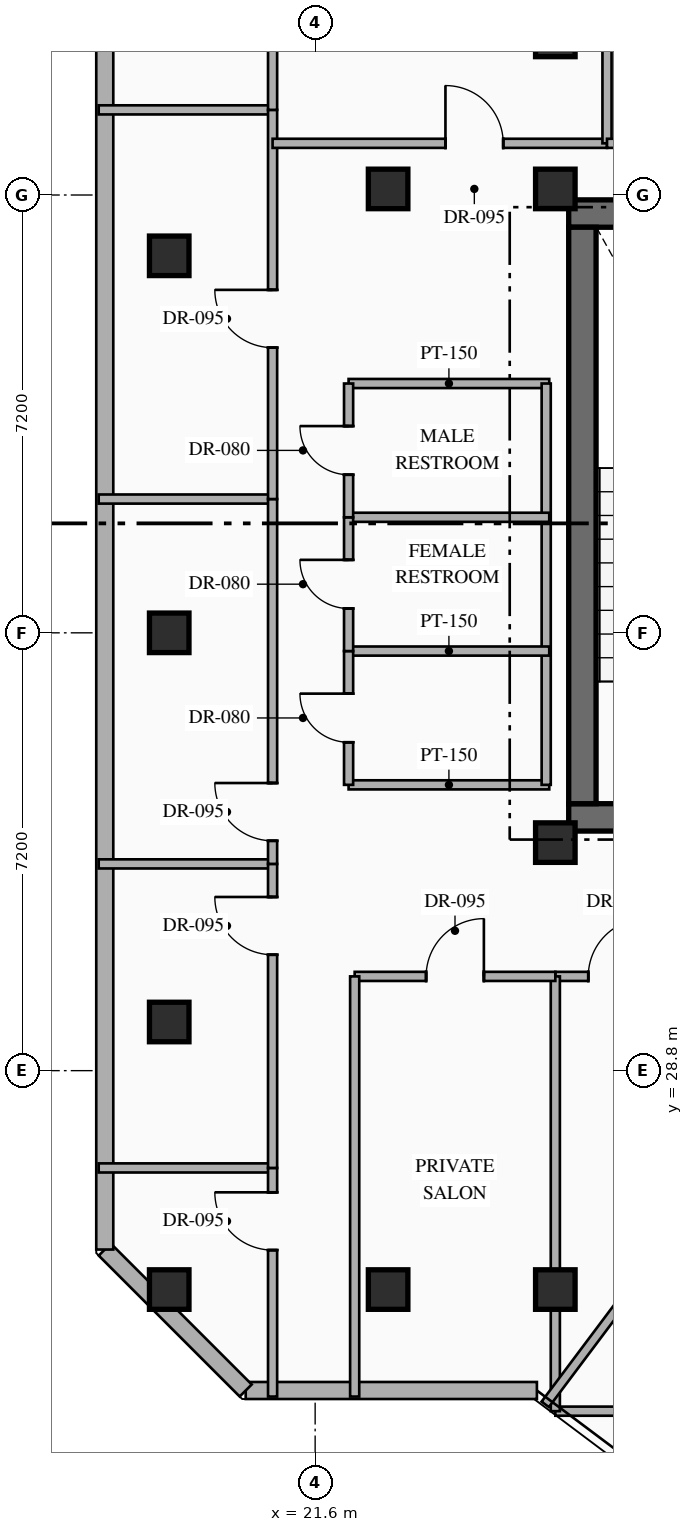
"""IFC4 building model, lengths in metres.
Left out: names, types, materials, properties, quantities, classifications, styles, units other than length and angle.
Written with IfcOpenShell. Run it as: python <this file> out.ifc"""

import sys

from ifc_helpers import new_model, si_unit, direction, frame, frame_2d, origin, origin_2d, place, context, subcontext, project, spatial, rectangle, hollow_rectangle, extrude, element, fill, save


model = new_model("IFC4")
c1 = context("Model", 3, precision=1e-05, world=origin(), true_north=direction((0.0, 1.0)))
c2 = subcontext(c1, "Body", "Model", "MODEL_VIEW")
j1 = project(units=[si_unit("LENGTHUNIT", "METRE"), si_unit("PLANEANGLEUNIT", "RADIAN")], contexts=[c1])
p1 = place(None, origin())
s1 = spatial("IfcSite", under=j1, at=p1, CompositionType="ELEMENT")
p2 = place(p1, origin())
s2 = spatial("IfcBuilding", under=s1, at=p2, CompositionType="ELEMENT")
p3 = place(p2, frame((0.0, 0.0, 246.75)))
s3 = spatial("IfcBuildingStorey", under=s2, at=p3, CompositionType="ELEMENT", Elevation=246.75)
p4 = place(p3, frame((25.77, 32.965, 0.0), z_axis=(0.0, 0.0, 1.0), x_axis=(1.0, 0.0, 0.0)))
e1 = element("IfcWall", 1, at=p4, inside=s3, PredefinedType="SHEAR", context=c2, shape_type="SweptSolid", body=[
    extrude(rectangle(XDim=7.48, YDim=0.45, at=frame_2d((3.74, 0.0))), origin(), (0.0, 0.0, 1.0), 3.6),
])
p5 = place(p4, frame((2.68, 0.0, 0.0)))
e2 = element("IfcOpeningElement", 2, at=p5, cuts=e1, PredefinedType="OPENING", context=c2, shape_type="SweptSolid", body=[
    extrude(rectangle(XDim=1.1, YDim=2.2, at=frame_2d((0.55, 1.1))), frame((0.0, 0.235, 0.0), z_axis=(0.0, -1.0, 0.0), x_axis=(1.0, 0.0, 0.0)), (0.0, 0.0, 1.0), 0.47),
])
p6 = place(p4, frame((5.43, 0.0, 0.0)))
e3 = element("IfcOpeningElement", 3, at=p6, cuts=e1, PredefinedType="OPENING", context=c2, shape_type="SweptSolid", body=[
    extrude(rectangle(XDim=1.1, YDim=2.15, at=frame_2d((0.55, 1.075))), frame((0.0, 0.235, 0.0), z_axis=(0.0, -1.0, 0.0), x_axis=(1.0, 0.0, 0.0)), (0.0, 0.0, 1.0), 0.47),
])
p7 = place(p3, frame((25.77, 42.895, 0.0), z_axis=(0.0, 0.0, 1.0), x_axis=(1.0, 0.0, 0.0)))
e4 = element("IfcWall", 4, at=p7, inside=s3, PredefinedType="SHEAR", context=c2, shape_type="SweptSolid", body=[
    extrude(rectangle(XDim=7.48, YDim=0.45, at=frame_2d((3.74, 0.0))), origin(), (0.0, 0.0, 1.0), 3.6),
])
p8 = place(p3, frame((25.995, 33.19, 0.0), z_axis=(0.0, 0.0, 1.0), x_axis=(0.0, 1.0, 0.0)))
e5 = element("IfcWall", 5, at=p8, inside=s3, PredefinedType="SHEAR", context=c2, shape_type="SweptSolid", body=[
    extrude(rectangle(XDim=9.48, YDim=0.45, at=frame_2d((4.74, 0.0))), origin(), (0.0, 0.0, 1.0), 3.6),
])
for number, where, z_axis, x_axis in (
    (6, (25.55, 32.55, 0.0), (0.0, 0.0, 1.0), (1.0, 0.0, 0.0)),
    (7, (25.55, 43.3, 0.0), (0.0, 0.0, 1.0), (1.0, 0.0, 0.0)),
    (8, (25.55, 25.2, 0.0), (0.0, 0.0, 1.0), (1.0, 0.0, 0.0)),
    (9, (25.55, 45.8, 0.0), (0.0, 0.0, 1.0), (1.0, 0.0, 0.0)),
    (10, (19.2, 25.2, 0.0), (0.0, 0.0, 1.0), (1.0, 0.0, 0.0)),
    (11, (19.2, 29.6, 0.0), (0.0, 0.0, 1.0), (1.0, 0.0, 0.0)),
    (12, (19.2, 42.2, 0.0), (0.0, 0.0, 1.0), (1.0, 0.0, 0.0)),
    (13, (22.8, 25.2, 0.0), (0.0, 0.0, 1.0), (1.0, 0.0, 0.0)),
    (14, (22.8, 43.3, 0.0), (0.0, 0.0, 1.0), (1.0, 0.0, 0.0)),
    (15, (19.2, 36.0, 0.0), (0.0, 0.0, 1.0), (1.0, 0.0, 0.0)),
):
    element("IfcColumn", number, at=place(p3, frame(where, z_axis=z_axis, x_axis=x_axis)), inside=s3, PredefinedType="COLUMN", context=c2, shape_type="SweptSolid", body=[
        extrude(hollow_rectangle(XDim=0.65, YDim=0.65, WallThickness=0.025, at=origin_2d()), origin(), (0.0, 0.0, 1.0), 3.6),
    ])
p9 = place(p3, frame((25.247, 23.54, 0.0), z_axis=(0.0, 0.0, 1.0), x_axis=(-1.0, 0.0, 0.0)))
e16 = element("IfcWall", 16, at=p9, inside=s3, PredefinedType="STANDARD", context=c2, shape_type="SweptSolid", body=[
    extrude(rectangle(XDim=4.789, YDim=0.28, at=frame_2d((2.395, 0.0))), origin(), (0.0, 0.0, 1.0), 3.35),
])
p10 = place(p3, frame((20.458, 23.54, 0.0), z_axis=(0.0, 0.0, 1.0), x_axis=(-0.707144017911, 0.707069542501, 0.0)))
e17 = element("IfcWall", 17, at=p10, inside=s3, PredefinedType="STANDARD", context=c2, shape_type="SweptSolid", body=[
    extrude(rectangle(XDim=3.278, YDim=0.28, at=frame_2d((1.639, 0.0))), origin(), (0.0, 0.0, 1.0), 3.35),
])
p11 = place(p3, frame((18.14, 25.858, 0.0), z_axis=(0.0, 0.0, 1.0), x_axis=(0.0, 1.0, 0.0)))
e18 = element("IfcWall", 18, at=p11, inside=s3, PredefinedType="STANDARD", context=c2, shape_type="SweptSolid", body=[
    extrude(rectangle(XDim=22.084, YDim=0.28, at=frame_2d((11.042, 0.0))), origin(), (0.0, 0.0, 1.0), 3.35),
])
for number, where, z_axis, x_axis in (
    (19, (22.15, 33.5, 0.0), (0.0, 0.0, 1.0), (1.0, 0.0, 0.0)),
    (20, (22.15, 40.1, 0.0), (0.0, 0.0, 1.0), (1.0, 0.0, 0.0)),
):
    element("IfcWall", number, at=place(p3, frame(where, z_axis=z_axis, x_axis=x_axis)), inside=s3, PredefinedType="PARTITIONING", context=c2, shape_type="SweptSolid", body=[
        extrude(rectangle(XDim=3.3, YDim=0.15, at=frame_2d((1.65, 0.0))), origin(), (0.0, 0.0, 1.0), 3.35),
    ])
p12 = place(p3, frame((25.4, 33.5, 0.0), z_axis=(0.0, 0.0, 1.0), x_axis=(0.0, 1.0, 0.0)))
e21 = element("IfcWall", 21, at=p12, inside=s3, PredefinedType="PARTITIONING", context=c2, shape_type="SweptSolid", body=[
    extrude(rectangle(XDim=6.6, YDim=0.15, at=frame_2d((3.3, 0.0))), origin(), (0.0, 0.0, 1.0), 3.35),
])
for number, where, z_axis, x_axis in (
    (22, (22.15, 35.7, 0.0), (0.0, 0.0, 1.0), (1.0, 0.0, 0.0)),
    (23, (22.15, 37.9, 0.0), (0.0, 0.0, 1.0), (1.0, 0.0, 0.0)),
):
    element("IfcWall", number, at=place(p3, frame(where, z_axis=z_axis, x_axis=x_axis)), inside=s3, PredefinedType="PARTITIONING", context=c2, shape_type="SweptSolid", body=[
        extrude(rectangle(XDim=3.3, YDim=0.15, at=frame_2d((1.65, 0.0))), origin(), (0.0, 0.0, 1.0), 3.35),
    ])
p13 = place(p3, frame((22.15, 33.5, 0.0), z_axis=(0.0, 0.0, 1.0), x_axis=(0.0, 1.0, 0.0)))
e24 = element("IfcWall", 24, at=p13, inside=s3, PredefinedType="PARTITIONING", context=c2, shape_type="SweptSolid", body=[
    extrude(rectangle(XDim=2.2, YDim=0.15, at=frame_2d((1.1, 0.0))), origin(), (0.0, 0.0, 1.0), 3.35),
])
p14 = place(p13, frame((0.7, 0.0, 0.0)))
e25 = element("IfcOpeningElement", 25, at=p14, cuts=e24, PredefinedType="OPENING", context=c2, shape_type="SweptSolid", body=[
    extrude(rectangle(XDim=0.8, YDim=2.06, at=frame_2d((0.4, 1.03))), frame((0.0, 0.085, 0.0), z_axis=(0.0, -1.0, 0.0), x_axis=(1.0, 0.0, 0.0)), (0.0, 0.0, 1.0), 0.17),
])
p15 = place(p3, frame((22.15, 35.7, 0.0), z_axis=(0.0, 0.0, 1.0), x_axis=(0.0, 1.0, 0.0)))
e26 = element("IfcWall", 26, at=p15, inside=s3, PredefinedType="PARTITIONING", context=c2, shape_type="SweptSolid", body=[
    extrude(rectangle(XDim=2.2, YDim=0.15, at=frame_2d((1.1, 0.0))), origin(), (0.0, 0.0, 1.0), 3.35),
])
p16 = place(p15, frame((0.7, 0.0, 0.0)))
e27 = element("IfcOpeningElement", 27, at=p16, cuts=e26, PredefinedType="OPENING", context=c2, shape_type="SweptSolid", body=[
    extrude(rectangle(XDim=0.8, YDim=2.06, at=frame_2d((0.4, 1.03))), frame((0.0, 0.085, 0.0), z_axis=(0.0, -1.0, 0.0), x_axis=(1.0, 0.0, 0.0)), (0.0, 0.0, 1.0), 0.17),
])
p17 = place(p3, frame((22.15, 37.9, 0.0), z_axis=(0.0, 0.0, 1.0), x_axis=(0.0, 1.0, 0.0)))
e28 = element("IfcWall", 28, at=p17, inside=s3, PredefinedType="PARTITIONING", context=c2, shape_type="SweptSolid", body=[
    extrude(rectangle(XDim=2.2, YDim=0.15, at=frame_2d((1.1, 0.0))), origin(), (0.0, 0.0, 1.0), 3.35),
])
p18 = place(p17, frame((0.7, 0.0, 0.0)))
e29 = element("IfcOpeningElement", 29, at=p18, cuts=e28, PredefinedType="OPENING", context=c2, shape_type="SweptSolid", body=[
    extrude(rectangle(XDim=0.8, YDim=2.06, at=frame_2d((0.4, 1.03))), frame((0.0, 0.085, 0.0), z_axis=(0.0, -1.0, 0.0), x_axis=(1.0, 0.0, 0.0)), (0.0, 0.0, 1.0), 0.17),
])
p19 = place(p3, frame((25.55, 23.2, 0.0), z_axis=(0.0, 0.0, 1.0), x_axis=(1.0, 0.0, 0.0)))
e30 = element("IfcWall", 30, at=p19, inside=s3, PredefinedType="PARTITIONING", context=c2, shape_type="SweptSolid", body=[
    extrude(rectangle(XDim=4.95, YDim=0.15, at=frame_2d((2.475, 0.0))), origin(), (0.0, 0.0, 1.0), 3.35),
])
p20 = place(p3, frame((25.55, 30.35, 0.0), z_axis=(0.0, 0.0, 1.0), x_axis=(1.0, 0.0, 0.0)))
e31 = element("IfcWall", 31, at=p20, inside=s3, PredefinedType="PARTITIONING", context=c2, shape_type="SweptSolid", body=[
    extrude(rectangle(XDim=4.95, YDim=0.15, at=frame_2d((2.475, 0.0))), origin(), (0.0, 0.0, 1.0), 3.35),
])
p21 = place(p20, frame((0.542, 0.0, 0.0)))
e32 = element("IfcOpeningElement", 32, at=p21, cuts=e31, PredefinedType="OPENING", context=c2, shape_type="SweptSolid", body=[
    extrude(rectangle(XDim=0.95, YDim=2.15, at=frame_2d((0.475, 1.075))), frame((0.0, 0.085, 0.0), z_axis=(0.0, -1.0, 0.0), x_axis=(1.0, 0.0, 0.0)), (0.0, 0.0, 1.0), 0.17),
])
p22 = place(p3, frame((25.55, 23.2, 0.0), z_axis=(0.0, 0.0, 1.0), x_axis=(0.0, 1.0, 0.0)))
e33 = element("IfcWall", 33, at=p22, inside=s3, PredefinedType="PARTITIONING", context=c2, shape_type="SweptSolid", body=[
    extrude(rectangle(XDim=7.15, YDim=0.15, at=frame_2d((3.575, 0.0))), origin(), (0.0, 0.0, 1.0), 2.757),
])
p23 = place(p3, frame((18.04, 27.2, 0.0), z_axis=(0.0, 0.0, 1.0), x_axis=(1.0, 0.0, 0.0)))
e34 = element("IfcWall", 34, at=p23, inside=s3, PredefinedType="PARTITIONING", context=c2, shape_type="SweptSolid", body=[
    extrude(rectangle(XDim=2.86, YDim=0.15, at=frame_2d((1.43, 0.0))), origin(), (0.0, 0.0, 1.0), 3.045),
])
p24 = place(p3, frame((20.9, 23.44, 0.0), z_axis=(0.0, 0.0, 1.0), x_axis=(0.0, 1.0, 0.0)))
e35 = element("IfcWall", 35, at=p24, inside=s3, PredefinedType="PARTITIONING", context=c2, shape_type="SweptSolid", body=[
    extrude(rectangle(XDim=3.76, YDim=0.15, at=frame_2d((1.88, 0.0))), origin(), (0.0, 0.0, 1.0), 3.35),
])
p25 = place(p24, frame((2.409, 0.0, 0.0)))
e36 = element("IfcOpeningElement", 36, at=p25, cuts=e35, PredefinedType="OPENING", context=c2, shape_type="SweptSolid", body=[
    extrude(rectangle(XDim=0.95, YDim=2.15, at=frame_2d((0.475, 1.075))), frame((0.0, 0.085, 0.0), z_axis=(0.0, -1.0, 0.0), x_axis=(1.0, 0.0, 0.0)), (0.0, 0.0, 1.0), 0.17),
])
p26 = place(p3, frame((18.04, 32.2, 0.0), z_axis=(0.0, 0.0, 1.0), x_axis=(1.0, 0.0, 0.0)))
e37 = element("IfcWall", 37, at=p26, inside=s3, PredefinedType="PARTITIONING", context=c2, shape_type="SweptSolid", body=[
    extrude(rectangle(XDim=2.86, YDim=0.15, at=frame_2d((1.43, 0.0))), origin(), (0.0, 0.0, 1.0), 3.35),
])
p27 = place(p3, frame((20.9, 27.2, 0.0), z_axis=(0.0, 0.0, 1.0), x_axis=(0.0, 1.0, 0.0)))
e38 = element("IfcWall", 38, at=p27, inside=s3, PredefinedType="PARTITIONING", context=c2, shape_type="SweptSolid", body=[
    extrude(rectangle(XDim=5.0, YDim=0.15, at=frame_2d((2.5, 0.0))), origin(), (0.0, 0.0, 1.0), 3.35),
])
p28 = place(p27, frame((3.506, 0.0, 0.0)))
e39 = element("IfcOpeningElement", 39, at=p28, cuts=e38, PredefinedType="OPENING", context=c2, shape_type="SweptSolid", body=[
    extrude(rectangle(XDim=0.95, YDim=2.15, at=frame_2d((0.475, 1.075))), frame((0.0, 0.085, 0.0), z_axis=(0.0, -1.0, 0.0), x_axis=(1.0, 0.0, 0.0)), (0.0, 0.0, 1.0), 0.17),
])
p29 = place(p3, frame((18.04, 38.2, 0.0), z_axis=(0.0, 0.0, 1.0), x_axis=(1.0, 0.0, 0.0)))
e40 = element("IfcWall", 40, at=p29, inside=s3, PredefinedType="PARTITIONING", context=c2, shape_type="SweptSolid", body=[
    extrude(rectangle(XDim=2.86, YDim=0.15, at=frame_2d((1.43, 0.0))), origin(), (0.0, 0.0, 1.0), 3.35),
])
p30 = place(p3, frame((20.9, 32.2, 0.0), z_axis=(0.0, 0.0, 1.0), x_axis=(0.0, 1.0, 0.0)))
e41 = element("IfcWall", 41, at=p30, inside=s3, PredefinedType="PARTITIONING", context=c2, shape_type="SweptSolid", body=[
    extrude(rectangle(XDim=6.0, YDim=0.15, at=frame_2d((3.0, 0.0))), origin(), (0.0, 0.0, 1.0), 3.35),
])
p31 = place(p30, frame((0.38, 0.0, 0.0)))
e42 = element("IfcOpeningElement", 42, at=p31, cuts=e41, PredefinedType="OPENING", context=c2, shape_type="SweptSolid", body=[
    extrude(rectangle(XDim=0.95, YDim=2.15, at=frame_2d((0.475, 1.075))), frame((0.0, 0.085, 0.0), z_axis=(0.0, -1.0, 0.0), x_axis=(1.0, 0.0, 0.0)), (0.0, 0.0, 1.0), 0.17),
])
p32 = place(p3, frame((18.04, 44.6, 0.0), z_axis=(0.0, 0.0, 1.0), x_axis=(1.0, 0.0, 0.0)))
e43 = element("IfcWall", 43, at=p32, inside=s3, PredefinedType="PARTITIONING", context=c2, shape_type="SweptSolid", body=[
    extrude(rectangle(XDim=2.86, YDim=0.15, at=frame_2d((1.43, 0.0))), origin(), (0.0, 0.0, 1.0), 3.35),
])
p33 = place(p3, frame((20.9, 38.2, 0.0), z_axis=(0.0, 0.0, 1.0), x_axis=(0.0, 1.0, 0.0)))
e44 = element("IfcWall", 44, at=p33, inside=s3, PredefinedType="PARTITIONING", context=c2, shape_type="SweptSolid", body=[
    extrude(rectangle(XDim=6.4, YDim=0.15, at=frame_2d((3.2, 0.0))), origin(), (0.0, 0.0, 1.0), 3.35),
])
p34 = place(p33, frame((2.49, 0.0, 0.0)))
e45 = element("IfcOpeningElement", 45, at=p34, cuts=e44, PredefinedType="OPENING", context=c2, shape_type="SweptSolid", body=[
    extrude(rectangle(XDim=0.95, YDim=2.15, at=frame_2d((0.475, 1.075))), frame((0.0, 0.085, 0.0), z_axis=(0.0, -1.0, 0.0), x_axis=(1.0, 0.0, 0.0)), (0.0, 0.0, 1.0), 0.17),
])
p35 = place(p3, frame((20.9, 44.6, 0.0), z_axis=(0.0, 0.0, 1.0), x_axis=(0.0, 1.0, 0.0)))
e46 = element("IfcWall", 46, at=p35, inside=s3, PredefinedType="PARTITIONING", context=c2, shape_type="SweptSolid", body=[
    extrude(rectangle(XDim=5.76, YDim=0.15, at=frame_2d((2.88, 0.0))), origin(), (0.0, 0.0, 1.0), 3.35),
])
p36 = place(p35, frame((2.405, 0.0, 0.0)))
e47 = element("IfcOpeningElement", 47, at=p36, cuts=e46, PredefinedType="OPENING", context=c2, shape_type="SweptSolid", body=[
    extrude(rectangle(XDim=0.95, YDim=2.15, at=frame_2d((0.475, 1.075))), frame((0.0, 0.085, 0.0), z_axis=(0.0, -1.0, 0.0), x_axis=(1.0, 0.0, 0.0)), (0.0, 0.0, 1.0), 0.17),
])
p37 = place(p3, frame((20.9, 44.05, 0.0), z_axis=(0.0, 0.0, 1.0), x_axis=(1.0, 0.0, 0.0)))
e48 = element("IfcWall", 48, at=p37, inside=s3, PredefinedType="PARTITIONING", context=c2, shape_type="SweptSolid", body=[
    extrude(rectangle(XDim=5.5, YDim=0.15, at=frame_2d((2.75, 0.0))), origin(), (0.0, 0.0, 1.0), 3.35),
])
p38 = place(p37, frame((2.843, 0.0, 0.0)))
e49 = element("IfcOpeningElement", 49, at=p38, cuts=e48, PredefinedType="OPENING", context=c2, shape_type="SweptSolid", body=[
    extrude(rectangle(XDim=0.95, YDim=2.15, at=frame_2d((0.475, 1.075))), frame((0.0, 0.085, 0.0), z_axis=(0.0, -1.0, 0.0), x_axis=(1.0, 0.0, 0.0)), (0.0, 0.0, 1.0), 0.17),
])
p39 = place(p3, frame((26.4, 44.05, 0.0), z_axis=(0.0, 0.0, 1.0), x_axis=(0.0, 1.0, 0.0)))
e50 = element("IfcWall", 50, at=p39, inside=s3, PredefinedType="PARTITIONING", context=c2, shape_type="SweptSolid", body=[
    extrude(rectangle(XDim=6.31, YDim=0.15, at=frame_2d((3.155, 0.0))), origin(), (0.0, 0.0, 1.0), 3.35),
])
p40 = place(p3, frame((26.4, 44.05, 0.0), z_axis=(0.0, 0.0, 1.0), x_axis=(1.0, 0.0, 0.0)))
e51 = element("IfcWall", 51, at=p40, inside=s3, PredefinedType="PARTITIONING", context=c2, shape_type="SweptSolid", body=[
    extrude(rectangle(XDim=6.4, YDim=0.15, at=frame_2d((3.2, 0.0))), origin(), (0.0, 0.0, 1.0), 3.35),
])
p41 = place(p40, frame((2.725, 0.0, 0.0)))
e52 = element("IfcOpeningElement", 52, at=p41, cuts=e51, PredefinedType="OPENING", context=c2, shape_type="SweptSolid", body=[
    extrude(rectangle(XDim=0.95, YDim=2.15, at=frame_2d((0.475, 1.075))), frame((0.0, 0.085, 0.0), z_axis=(0.0, -1.0, 0.0), x_axis=(1.0, 0.0, 0.0)), (0.0, 0.0, 1.0), 0.17),
])
p42 = place(p3, frame((22.25, 30.35, 0.0), z_axis=(0.0, 0.0, 1.0), x_axis=(1.0, 0.0, 0.0)))
e53 = element("IfcWall", 53, at=p42, inside=s3, PredefinedType="PARTITIONING", context=c2, shape_type="SweptSolid", body=[
    extrude(rectangle(XDim=3.3, YDim=0.15, at=frame_2d((1.65, 0.0))), origin(), (0.0, 0.0, 1.0), 3.35),
])
p43 = place(p42, frame((1.175, 0.0, 0.0)))
e54 = element("IfcOpeningElement", 54, at=p43, cuts=e53, PredefinedType="OPENING", context=c2, shape_type="SweptSolid", body=[
    extrude(rectangle(XDim=0.95, YDim=2.15, at=frame_2d((0.475, 1.075))), frame((0.0, 0.085, 0.0), z_axis=(0.0, -1.0, 0.0), x_axis=(1.0, 0.0, 0.0)), (0.0, 0.0, 1.0), 0.17),
])
p44 = place(p3, frame((22.25, 23.44, 0.0), z_axis=(0.0, 0.0, 1.0), x_axis=(0.0, 1.0, 0.0)))
e55 = element("IfcWall", 55, at=p44, inside=s3, PredefinedType="PARTITIONING", context=c2, shape_type="SweptSolid", body=[
    extrude(rectangle(XDim=6.91, YDim=0.15, at=frame_2d((3.455, 0.0))), origin(), (0.0, 0.0, 1.0), 3.35),
])
p45 = place(p3, frame((25.384, 23.312, 0.0), z_axis=(0.0, 0.0, 1.0), x_axis=(0.599990721155, 0.80000695905, 0.0)))
e56 = element("IfcWall", 56, at=p45, inside=s3, PredefinedType="PARTITIONING", context=c2, shape_type="SweptSolid", body=[
    extrude(rectangle(XDim=4.21, YDim=0.15, at=frame_2d((2.105, 0.0))), origin(), (0.0, 0.0, 1.0), 3.35),
])
p46 = place(p14, origin())
e57 = element("IfcDoor", 57, at=p46, inside=s3, OperationType="SINGLE_SWING_RIGHT", PredefinedType="DOOR", context=c2, shape_type="SweptSolid", body=[
    extrude(rectangle(XDim=0.8, YDim=2.06, at=frame_2d((0.4, 1.03))), frame((0.0, 0.025, 0.0), z_axis=(0.0, -1.0, 0.0), x_axis=(1.0, 0.0, 0.0)), (0.0, 0.0, 1.0), 0.05),
])
fill(e25, e57)
p47 = place(p16, origin())
e58 = element("IfcDoor", 58, at=p47, inside=s3, OperationType="SINGLE_SWING_RIGHT", PredefinedType="DOOR", context=c2, shape_type="SweptSolid", body=[
    extrude(rectangle(XDim=0.8, YDim=2.06, at=frame_2d((0.4, 1.03))), frame((0.0, 0.025, 0.0), z_axis=(0.0, -1.0, 0.0), x_axis=(1.0, 0.0, 0.0)), (0.0, 0.0, 1.0), 0.05),
])
fill(e27, e58)
p48 = place(p18, origin())
e59 = element("IfcDoor", 59, at=p48, inside=s3, OperationType="SINGLE_SWING_RIGHT", PredefinedType="DOOR", context=c2, shape_type="SweptSolid", body=[
    extrude(rectangle(XDim=0.8, YDim=2.06, at=frame_2d((0.4, 1.03))), frame((0.0, 0.025, 0.0), z_axis=(0.0, -1.0, 0.0), x_axis=(1.0, 0.0, 0.0)), (0.0, 0.0, 1.0), 0.05),
])
fill(e29, e59)
p49 = place(p21, origin())
e60 = element("IfcDoor", 60, at=p49, inside=s3, OperationType="SINGLE_SWING_RIGHT", PredefinedType="DOOR", context=c2, shape_type="SweptSolid", body=[
    extrude(rectangle(XDim=0.95, YDim=2.15, at=frame_2d((0.475, 1.075))), frame((0.0, 0.025, 0.0), z_axis=(0.0, -1.0, 0.0), x_axis=(1.0, 0.0, 0.0)), (0.0, 0.0, 1.0), 0.05),
])
fill(e32, e60)
p50 = place(p25, origin())
e61 = element("IfcDoor", 61, at=p50, inside=s3, OperationType="SINGLE_SWING_RIGHT", PredefinedType="DOOR", context=c2, shape_type="SweptSolid", body=[
    extrude(rectangle(XDim=0.95, YDim=2.15, at=frame_2d((0.475, 1.075))), frame((0.0, 0.025, 0.0), z_axis=(0.0, -1.0, 0.0), x_axis=(1.0, 0.0, 0.0)), (0.0, 0.0, 1.0), 0.05),
])
fill(e36, e61)
p51 = place(p28, origin())
e62 = element("IfcDoor", 62, at=p51, inside=s3, OperationType="SINGLE_SWING_RIGHT", PredefinedType="DOOR", context=c2, shape_type="SweptSolid", body=[
    extrude(rectangle(XDim=0.95, YDim=2.15, at=frame_2d((0.475, 1.075))), frame((0.0, 0.025, 0.0), z_axis=(0.0, -1.0, 0.0), x_axis=(1.0, 0.0, 0.0)), (0.0, 0.0, 1.0), 0.05),
])
fill(e39, e62)
p52 = place(p31, origin())
e63 = element("IfcDoor", 63, at=p52, inside=s3, OperationType="SINGLE_SWING_RIGHT", PredefinedType="DOOR", context=c2, shape_type="SweptSolid", body=[
    extrude(rectangle(XDim=0.95, YDim=2.15, at=frame_2d((0.475, 1.075))), frame((0.0, 0.025, 0.0), z_axis=(0.0, -1.0, 0.0), x_axis=(1.0, 0.0, 0.0)), (0.0, 0.0, 1.0), 0.05),
])
fill(e42, e63)
p53 = place(p34, origin())
e64 = element("IfcDoor", 64, at=p53, inside=s3, OperationType="SINGLE_SWING_RIGHT", PredefinedType="DOOR", context=c2, shape_type="SweptSolid", body=[
    extrude(rectangle(XDim=0.95, YDim=2.15, at=frame_2d((0.475, 1.075))), frame((0.0, 0.025, 0.0), z_axis=(0.0, -1.0, 0.0), x_axis=(1.0, 0.0, 0.0)), (0.0, 0.0, 1.0), 0.05),
])
fill(e45, e64)
p54 = place(p38, origin())
e65 = element("IfcDoor", 65, at=p54, inside=s3, OperationType="SINGLE_SWING_LEFT", PredefinedType="DOOR", context=c2, shape_type="SweptSolid", body=[
    extrude(rectangle(XDim=0.95, YDim=2.15, at=frame_2d((0.475, 1.075))), frame((0.0, 0.025, 0.0), z_axis=(0.0, -1.0, 0.0), x_axis=(1.0, 0.0, 0.0)), (0.0, 0.0, 1.0), 0.05),
])
fill(e49, e65)
p55 = place(p43, origin())
e66 = element("IfcDoor", 66, at=p55, inside=s3, OperationType="SINGLE_SWING_RIGHT", PredefinedType="DOOR", context=c2, shape_type="SweptSolid", body=[
    extrude(rectangle(XDim=0.95, YDim=2.15, at=frame_2d((0.475, 1.075))), frame((0.0, 0.025, 0.0), z_axis=(0.0, -1.0, 0.0), x_axis=(1.0, 0.0, 0.0)), (0.0, 0.0, 1.0), 0.05),
])
fill(e54, e66)
save(model, sys.argv[1])
